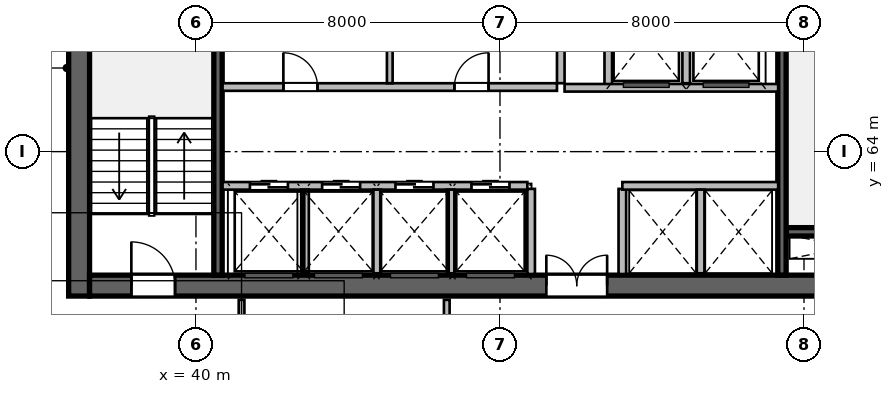
"""IFC4 building model, lengths in metres.
Left out: names, types, materials, properties, quantities, classifications, styles, units other than length and angle.
Written with IfcOpenShell. Run it as: python <this file> out.ifc"""

import sys

from ifc_helpers import new_model, si_unit, direction, frame, frame_2d, origin, place, context, subcontext, project, spatial, rectangle, extrude, source, transform, mapped, element, fill, save


model = new_model("IFC4")
c1 = context("Model", 3, precision=1e-05, world=origin(), true_north=direction((0.0, 1.0)))
c2 = subcontext(c1, "Body", "Model", "MODEL_VIEW")
j1 = project(units=[si_unit("LENGTHUNIT", "METRE"), si_unit("PLANEANGLEUNIT", "RADIAN")], contexts=[c1])
p1 = place(None, origin())
s1 = spatial("IfcSite", under=j1, at=p1, CompositionType="ELEMENT")
p2 = place(p1, origin())
s2 = spatial("IfcBuilding", under=s1, at=p2, CompositionType="ELEMENT")
p3 = place(p2, frame((0.0, 0.0, 57.0)))
s3 = spatial("IfcBuildingStorey", under=s2, at=p3, CompositionType="ELEMENT", Elevation=57.0)
m1 = source(origin(), c2, "Body", "SweptSolid", [
    extrude(rectangle(XDim=12.0, YDim=0.55, at=frame_2d((6.0, 0.0))), origin(), (0.0, 0.0, 1.0), 3.6),
])
p4 = place(p3, frame((36.925, 60.2, 0.0), z_axis=(0.0, 0.0, 1.0), x_axis=(0.0, 1.0, 0.0)))
e1 = element("IfcWall", 1, at=p4, inside=s3, PredefinedType="SHEAR", context=c2, shape_type="MappedRepresentation", body=[
    mapped(m1, transform((0.0, 0.0, 0.0), scale=1.0)),
])
m2 = source(origin(), c2, "Body", "SweptSolid", [
    extrude(rectangle(XDim=21.6, YDim=0.55, at=frame_2d((10.8, 0.0))), origin(), (0.0, 0.0, 1.0), 3.6),
])
p5 = place(p3, frame((37.2, 60.475, 0.0), z_axis=(0.0, 0.0, 1.0), x_axis=(1.0, 0.0, 0.0)))
e2 = element("IfcWall", 2, at=p5, inside=s3, PredefinedType="SHEAR", context=c2, shape_type="MappedRepresentation", body=[
    mapped(m2, transform((0.0, 0.0, 0.0), scale=1.0)),
])
p6 = place(p5, frame((1.1, 0.0, 0.0)))
e3 = element("IfcOpeningElement", 3, at=p6, cuts=e2, PredefinedType="OPENING", context=c2, shape_type="SweptSolid", body=[
    extrude(rectangle(XDim=1.15, YDim=2.15, at=frame_2d((0.575, 1.075))), frame((0.0, 0.285, 0.0), z_axis=(0.0, -1.0, 0.0), x_axis=(1.0, 0.0, 0.0)), (0.0, 0.0, 1.0), 0.57),
])
p7 = place(p5, frame((19.5, 0.0, 0.0)))
e4 = element("IfcOpeningElement", 4, at=p7, cuts=e2, PredefinedType="OPENING", context=c2, shape_type="SweptSolid", body=[
    extrude(rectangle(XDim=0.9, YDim=2.1, at=frame_2d((0.45, 1.05))), frame((0.0, 0.285, 0.0), z_axis=(0.0, -1.0, 0.0), x_axis=(1.0, 0.0, 0.0)), (0.0, 0.0, 1.0), 0.57),
])
p8 = place(p5, frame((12.02, 0.0, 0.0)))
e5 = element("IfcOpeningElement", 5, at=p8, cuts=e2, PredefinedType="OPENING", context=c2, shape_type="SweptSolid", body=[
    extrude(rectangle(XDim=1.6, YDim=2.15, at=frame_2d((0.8, 1.075))), frame((0.0, 0.285, 0.0), z_axis=(0.0, -1.0, 0.0), x_axis=(1.0, 0.0, 0.0)), (0.0, 0.0, 1.0), 0.57),
])
m3 = source(origin(), c2, "Body", "SweptSolid", [
    extrude(rectangle(XDim=3.27, YDim=0.22, at=frame_2d((1.635, 0.0))), origin(), (0.0, 0.0, 1.0), 3.6),
])
p9 = place(p3, frame((55.53, 61.89, 0.0), z_axis=(0.0, 0.0, 1.0), x_axis=(1.0, 0.0, 0.0)))
e6 = element("IfcWall", 6, at=p9, inside=s3, PredefinedType="SHEAR", context=c2, shape_type="MappedRepresentation", body=[
    mapped(m3, transform((0.0, 0.0, 0.0), scale=1.0)),
])
m4 = source(origin(), c2, "Body", "SweptSolid", [
    extrude(rectangle(XDim=10.9, YDim=0.22, at=frame_2d((5.45, 0.0))), origin(), (0.0, 0.0, 1.0), 3.6),
])
p10 = place(p3, frame((40.58, 60.75, 0.0), z_axis=(0.0, 0.0, 1.0), x_axis=(0.0, 1.0, 0.0)))
e7 = element("IfcWall", 7, at=p10, inside=s3, PredefinedType="SHEAR", context=c2, shape_type="MappedRepresentation", body=[
    mapped(m4, transform((0.0, 0.0, 0.0), scale=1.0)),
])
p11 = place(p3, frame((55.42, 60.75, 0.0), z_axis=(0.0, 0.0, 1.0), x_axis=(0.0, 1.0, 0.0)))
e8 = element("IfcWall", 8, at=p11, inside=s3, PredefinedType="SHEAR", context=c2, shape_type="MappedRepresentation", body=[
    mapped(m4, transform((0.0, 0.0, 0.0), scale=1.0)),
])
p12 = place(p11, frame((9.495, 0.0, 0.0)))
e9 = element("IfcOpeningElement", 9, at=p12, cuts=e8, PredefinedType="OPENING", context=c2, shape_type="SweptSolid", body=[
    extrude(rectangle(XDim=1.15, YDim=2.15, at=frame_2d((0.575, 1.075))), frame((0.0, 0.12, 0.0), z_axis=(0.0, -1.0, 0.0), x_axis=(1.0, 0.0, 0.0)), (0.0, 0.0, 1.0), 0.24),
])
m5 = source(origin(), c2, "Body", "SweptSolid", [
    extrude(rectangle(XDim=2.24, YDim=0.2, at=frame_2d((1.12, 0.0))), origin(), (0.0, 0.0, 1.0), 3.36),
])
for number, where, z_axis, x_axis in (
    (10, (48.82, 60.78, 0.0), (0.0, 0.0, 1.0), (0.0, 1.0, 0.0)),
    (11, (51.22, 60.78, 0.0), (0.0, 0.0, 1.0), (0.0, 1.0, 0.0)),
):
    element("IfcWall", number, at=place(p3, frame(where, z_axis=z_axis, x_axis=x_axis)), inside=s3, PredefinedType="SOLIDWALL", context=c2, shape_type="MappedRepresentation", body=[
        mapped(m5, transform((0.0, 0.0, 0.0), scale=1.0)),
    ])
m6 = source(origin(), c2, "Body", "SweptSolid", [
    extrude(rectangle(XDim=5.8, YDim=0.2, at=frame_2d((2.9, 0.0))), origin(), (0.0, 0.0, 1.0), 3.36),
])
p13 = place(p3, frame((49.6, 65.8, 0.0), z_axis=(0.0, 0.0, 1.0), x_axis=(0.0, 1.0, 0.0)))
e12 = element("IfcWall", 12, at=p13, inside=s3, PredefinedType="SOLIDWALL", context=c2, shape_type="MappedRepresentation", body=[
    mapped(m6, transform((0.0, 0.0, 0.0), scale=1.0)),
])
m7 = source(origin(), c2, "Body", "SweptSolid", [
    extrude(rectangle(XDim=2.58, YDim=0.2, at=frame_2d((1.29, 0.0))), origin(), (0.0, 0.0, 1.0), 3.36),
])
p14 = place(p3, frame((50.85, 65.68, 0.0), z_axis=(0.0, 0.0, 1.0), x_axis=(0.0, 1.0, 0.0)))
e13 = element("IfcWall", 13, at=p14, inside=s3, PredefinedType="SOLIDWALL", context=c2, shape_type="MappedRepresentation", body=[
    mapped(m7, transform((0.0, 0.0, 0.0), scale=1.0)),
])
m8 = source(origin(), c2, "Body", "SweptSolid", [
    extrude(rectangle(XDim=2.4, YDim=0.2, at=frame_2d((1.2, 0.0))), origin(), (0.0, 0.0, 1.0), 3.36),
])
p15 = place(p3, frame((52.9, 65.8, 0.0), z_axis=(0.0, 0.0, 1.0), x_axis=(0.0, 1.0, 0.0)))
e14 = element("IfcWall", 14, at=p15, inside=s3, PredefinedType="SOLIDWALL", context=c2, shape_type="MappedRepresentation", body=[
    mapped(m8, transform((0.0, 0.0, 0.0), scale=1.0)),
])
m9 = source(origin(), c2, "Body", "SweptSolid", [
    extrude(rectangle(XDim=5.62, YDim=0.2, at=frame_2d((2.81, 0.0))), origin(), (0.0, 0.0, 1.0), 3.36),
])
p16 = place(p3, frame((49.7, 65.68, 0.0), z_axis=(0.0, 0.0, 1.0), x_axis=(1.0, 0.0, 0.0)))
e15 = element("IfcWall", 15, at=p16, inside=s3, PredefinedType="SOLIDWALL", context=c2, shape_type="MappedRepresentation", body=[
    mapped(m9, transform((0.0, 0.0, 0.0), scale=1.0)),
])
m10 = source(origin(), c2, "Body", "SweptSolid", [
    extrude(rectangle(XDim=8.02, YDim=0.2, at=frame_2d((4.01, 0.0))), origin(), (0.0, 0.0, 1.0), 3.36),
])
p17 = place(p3, frame((40.7, 63.1, 0.0), z_axis=(0.0, 0.0, 1.0), x_axis=(1.0, 0.0, 0.0)))
e16 = element("IfcWall", 16, at=p17, inside=s3, PredefinedType="SOLIDWALL", context=c2, shape_type="MappedRepresentation", body=[
    mapped(m10, transform((0.0, 0.0, 0.0), scale=1.0)),
])
p18 = place(p17, frame((0.72, 0.0, 0.0)))
e17 = element("IfcOpeningElement", 17, at=p18, cuts=e16, PredefinedType="OPENING", context=c2, shape_type="SweptSolid", body=[
    extrude(rectangle(XDim=1.0, YDim=2.15, at=frame_2d((0.5, 1.075))), frame((0.0, 0.11, 0.0), z_axis=(0.0, -1.0, 0.0), x_axis=(1.0, 0.0, 0.0)), (0.0, 0.0, 1.0), 0.22),
])
p19 = place(p17, frame((2.62, 0.0, 0.0)))
e18 = element("IfcOpeningElement", 18, at=p19, cuts=e16, PredefinedType="OPENING", context=c2, shape_type="SweptSolid", body=[
    extrude(rectangle(XDim=1.0, YDim=2.15, at=frame_2d((0.5, 1.075))), frame((0.0, 0.11, 0.0), z_axis=(0.0, -1.0, 0.0), x_axis=(1.0, 0.0, 0.0)), (0.0, 0.0, 1.0), 0.22),
])
p20 = place(p17, frame((4.55, 0.0, 0.0)))
e19 = element("IfcOpeningElement", 19, at=p20, cuts=e16, PredefinedType="OPENING", context=c2, shape_type="SweptSolid", body=[
    extrude(rectangle(XDim=1.0, YDim=2.15, at=frame_2d((0.5, 1.075))), frame((0.0, 0.11, 0.0), z_axis=(0.0, -1.0, 0.0), x_axis=(1.0, 0.0, 0.0)), (0.0, 0.0, 1.0), 0.22),
])
p21 = place(p17, frame((6.55, 0.0, 0.0)))
e20 = element("IfcOpeningElement", 20, at=p21, cuts=e16, PredefinedType="OPENING", context=c2, shape_type="SweptSolid", body=[
    extrude(rectangle(XDim=1.0, YDim=2.15, at=frame_2d((0.5, 1.075))), frame((0.0, 0.11, 0.0), z_axis=(0.0, -1.0, 0.0), x_axis=(1.0, 0.0, 0.0)), (0.0, 0.0, 1.0), 0.22),
])
m11 = source(origin(), c2, "Body", "SweptSolid", [
    extrude(rectangle(XDim=4.1, YDim=0.2, at=frame_2d((2.05, 0.0))), origin(), (0.0, 0.0, 1.0), 3.36),
])
p22 = place(p3, frame((51.22, 63.1, 0.0), z_axis=(0.0, 0.0, 1.0), x_axis=(1.0, 0.0, 0.0)))
e21 = element("IfcWall", 21, at=p22, inside=s3, PredefinedType="SOLIDWALL", context=c2, shape_type="MappedRepresentation", body=[
    mapped(m11, transform((0.0, 0.0, 0.0), scale=1.0)),
])
m12 = source(origin(), c2, "Body", "SweptSolid", [
    extrude(rectangle(XDim=2.2, YDim=0.2, at=frame_2d((1.1, 0.0))), origin(), (0.0, 0.0, 1.0), 3.36),
])
for number, where, z_axis, x_axis in (
    (22, (42.87, 60.8, 0.0), (0.0, 0.0, 1.0), (0.0, 1.0, 0.0)),
    (23, (44.77, 60.8, 0.0), (0.0, 0.0, 1.0), (0.0, 1.0, 0.0)),
    (24, (46.7, 60.8, 0.0), (0.0, 0.0, 1.0), (0.0, 1.0, 0.0)),
    (25, (53.28, 60.8, 0.0), (0.0, 0.0, 1.0), (0.0, 1.0, 0.0)),
):
    element("IfcWall", number, at=place(p3, frame(where, z_axis=z_axis, x_axis=x_axis)), inside=s3, PredefinedType="SOLIDWALL", context=c2, shape_type="MappedRepresentation", body=[
        mapped(m12, transform((0.0, 0.0, 0.0), scale=1.0)),
    ])
m13 = source(origin(), c2, "Body", "SweptSolid", [
    extrude(rectangle(XDim=8.8, YDim=0.2, at=frame_2d((4.4, 0.0))), origin(), (0.0, 0.0, 1.0), 3.36),
])
p23 = place(p3, frame((40.7, 65.7, 0.0), z_axis=(0.0, 0.0, 1.0), x_axis=(1.0, 0.0, 0.0)))
e26 = element("IfcWall", 26, at=p23, inside=s3, PredefinedType="SOLIDWALL", context=c2, shape_type="MappedRepresentation", body=[
    mapped(m13, transform((0.0, 0.0, 0.0), scale=1.0)),
])
p24 = place(p23, frame((1.6, 0.0, 0.0)))
e27 = element("IfcOpeningElement", 27, at=p24, cuts=e26, PredefinedType="OPENING", context=c2, shape_type="SweptSolid", body=[
    extrude(rectangle(XDim=0.9, YDim=2.1, at=frame_2d((0.45, 1.05))), frame((0.0, 0.11, 0.0), z_axis=(0.0, -1.0, 0.0), x_axis=(1.0, 0.0, 0.0)), (0.0, 0.0, 1.0), 0.22),
])
p25 = place(p23, frame((6.1, 0.0, 0.0)))
e28 = element("IfcOpeningElement", 28, at=p25, cuts=e26, PredefinedType="OPENING", context=c2, shape_type="SweptSolid", body=[
    extrude(rectangle(XDim=0.9, YDim=2.1, at=frame_2d((0.45, 1.05))), frame((0.0, 0.11, 0.0), z_axis=(0.0, -1.0, 0.0), x_axis=(1.0, 0.0, 0.0)), (0.0, 0.0, 1.0), 0.22),
])
m14 = source(origin(), c2, "Body", "SweptSolid", [
    extrude(rectangle(XDim=2.4, YDim=0.15, at=frame_2d((1.2, 0.0))), origin(), (0.0, 0.0, 1.0), 3.36),
])
p26 = place(p3, frame((45.1, 65.8, 0.0), z_axis=(0.0, 0.0, 1.0), x_axis=(0.0, 1.0, 0.0)))
e29 = element("IfcWall", 29, at=p26, inside=s3, PredefinedType="PARTITIONING", context=c2, shape_type="MappedRepresentation", body=[
    mapped(m14, transform((0.0, 0.0, 0.0), scale=1.0)),
])
m15 = source(origin(), c2, "Body", "SweptSolid", [
    extrude(rectangle(XDim=2.033, YDim=0.15, at=frame_2d((1.016, 0.0))), origin(), (0.0, 0.0, 1.0), 3.36),
])
p27 = place(p3, frame((41.2, 58.067, 0.0), z_axis=(0.0, 0.0, 1.0), x_axis=(0.0, 1.0, 0.0)))
e30 = element("IfcWall", 30, at=p27, inside=s3, PredefinedType="PARTITIONING", context=c2, shape_type="MappedRepresentation", body=[
    mapped(m15, transform((0.0, 0.0, 0.0), scale=1.0)),
])
p28 = place(p27, frame((0.591, 0.0, 0.0)))
e31 = element("IfcOpeningElement", 31, at=p28, cuts=e30, PredefinedType="OPENING", context=c2, shape_type="SweptSolid", body=[
    extrude(rectangle(XDim=0.85, YDim=2.1, at=frame_2d((0.425, 1.05))), frame((0.0, 0.085, 0.0), z_axis=(0.0, -1.0, 0.0), x_axis=(1.0, 0.0, 0.0)), (0.0, 0.0, 1.0), 0.17),
])
p29 = place(p3, frame((46.6, 58.067, 0.0), z_axis=(0.0, 0.0, 1.0), x_axis=(0.0, 1.0, 0.0)))
e32 = element("IfcWall", 32, at=p29, inside=s3, PredefinedType="PARTITIONING", context=c2, shape_type="MappedRepresentation", body=[
    mapped(m15, transform((0.0, 0.0, 0.0), scale=1.0)),
])
m16 = source(origin(), c2, "Body", "SweptSolid", [
    extrude(rectangle(XDim=12.196, YDim=0.18, at=frame_2d((6.098, 0.0))), origin(), (0.0, 0.0, 1.0), 3.36),
])
p30 = place(p3, frame((38.258, 48.766, 0.0), z_axis=(0.0, 0.0, 1.0), x_axis=(-0.342022711534, 0.939691686031, 0.0)))
e33 = element("IfcWall", 33, at=p30, inside=s3, PredefinedType="PLUMBINGWALL", context=c2, shape_type="MappedRepresentation", body=[
    mapped(m16, transform((0.0, 0.0, 0.0), scale=1.0)),
])
m17 = source(origin(), c2, "Body", "SweptSolid", [
    extrude(rectangle(XDim=1.15, YDim=2.15, at=frame_2d((0.575, 1.075))), frame((0.0, 0.025, 0.0), z_axis=(0.0, -1.0, 0.0), x_axis=(1.0, 0.0, 0.0)), (0.0, 0.0, 1.0), 0.05),
])
p31 = place(p6, origin())
e34 = element("IfcDoor", 34, at=p31, inside=s3, OperationType="SINGLE_SWING_LEFT", PredefinedType="DOOR", context=c2, shape_type="MappedRepresentation", body=[
    mapped(m17, transform((0.0, 0.0, 0.0), scale=1.0)),
])
fill(e3, e34)
m18 = source(origin(), c2, "Body", "SweptSolid", [
    extrude(rectangle(XDim=1.6, YDim=2.15, at=frame_2d((0.8, 1.075))), frame((0.0, 0.025, 0.0), z_axis=(0.0, -1.0, 0.0), x_axis=(1.0, 0.0, 0.0)), (0.0, 0.0, 1.0), 0.05),
])
p32 = place(p8, origin())
e35 = element("IfcDoor", 35, at=p32, inside=s3, OperationType="DOUBLE_DOOR_SINGLE_SWING", PredefinedType="DOOR", context=c2, shape_type="MappedRepresentation", body=[
    mapped(m18, transform((0.0, 0.0, 0.0), scale=1.0)),
])
fill(e5, e35)
m19 = source(origin(), c2, "Body", "SweptSolid", [
    extrude(rectangle(XDim=1.0, YDim=2.15, at=frame_2d((0.5, 1.075))), frame((0.0, 0.025, 0.0), z_axis=(0.0, -1.0, 0.0), x_axis=(1.0, 0.0, 0.0)), (0.0, 0.0, 1.0), 0.05),
])
p33 = place(p18, origin())
e36 = element("IfcDoor", 36, at=p33, inside=s3, OperationType="DOUBLE_DOOR_SLIDING", PredefinedType="DOOR", context=c2, shape_type="MappedRepresentation", body=[
    mapped(m19, transform((0.0, 0.0, 0.0), scale=1.0)),
])
fill(e17, e36)
p34 = place(p19, origin())
e37 = element("IfcDoor", 37, at=p34, inside=s3, OperationType="DOUBLE_DOOR_SLIDING", PredefinedType="DOOR", context=c2, shape_type="MappedRepresentation", body=[
    mapped(m19, transform((0.0, 0.0, 0.0), scale=1.0)),
])
fill(e18, e37)
p35 = place(p20, origin())
e38 = element("IfcDoor", 38, at=p35, inside=s3, OperationType="DOUBLE_DOOR_SLIDING", PredefinedType="DOOR", context=c2, shape_type="MappedRepresentation", body=[
    mapped(m19, transform((0.0, 0.0, 0.0), scale=1.0)),
])
fill(e19, e38)
p36 = place(p21, origin())
e39 = element("IfcDoor", 39, at=p36, inside=s3, OperationType="DOUBLE_DOOR_SLIDING", PredefinedType="DOOR", context=c2, shape_type="MappedRepresentation", body=[
    mapped(m19, transform((0.0, 0.0, 0.0), scale=1.0)),
])
fill(e20, e39)
m20 = source(origin(), c2, "Body", "SweptSolid", [
    extrude(rectangle(XDim=0.9, YDim=2.1, at=frame_2d((0.45, 1.05))), frame((0.0, 0.025, 0.0), z_axis=(0.0, -1.0, 0.0), x_axis=(1.0, 0.0, 0.0)), (0.0, 0.0, 1.0), 0.05),
])
p37 = place(p24, origin())
e40 = element("IfcDoor", 40, at=p37, inside=s3, OperationType="SINGLE_SWING_LEFT", PredefinedType="DOOR", context=c2, shape_type="MappedRepresentation", body=[
    mapped(m20, transform((0.0, 0.0, 0.0), scale=1.0)),
])
fill(e27, e40)
p38 = place(p25, origin())
e41 = element("IfcDoor", 41, at=p38, inside=s3, OperationType="SINGLE_SWING_RIGHT", PredefinedType="DOOR", context=c2, shape_type="MappedRepresentation", body=[
    mapped(m20, transform((0.0, 0.0, 0.0), scale=1.0)),
])
fill(e28, e41)
save(model, sys.argv[1])
